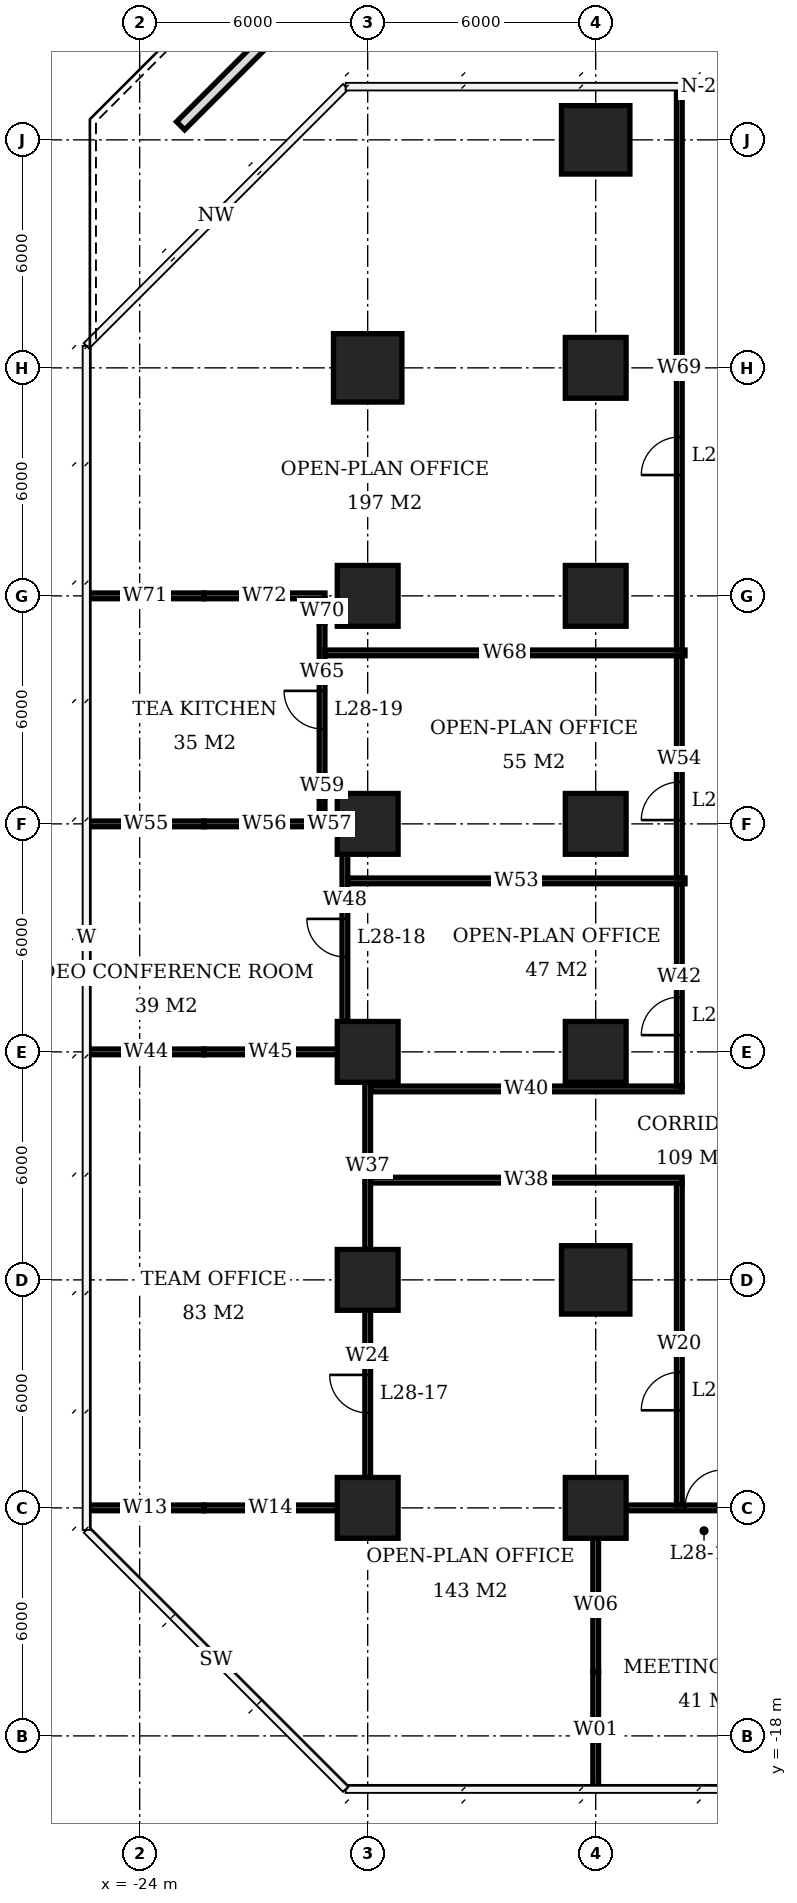
"""IFC4 building model, lengths in metres.
Left out: names, types, materials, properties, quantities, classifications, styles, units other than length and angle.
Written with IfcOpenShell. Run it as: python <this file> out.ifc"""

import sys

from ifc_helpers import new_model, si_unit, direction, frame, frame_2d, origin, origin_2d, place, context, subcontext, project, spatial, rectangle, extrude, element, fill, save


model = new_model("IFC4")
c1 = context("Model", 3, precision=1e-05, world=origin(), true_north=direction((0.0, 1.0)))
c2 = subcontext(c1, "Body", "Model", "MODEL_VIEW")
j1 = project(units=[si_unit("LENGTHUNIT", "METRE"), si_unit("PLANEANGLEUNIT", "RADIAN")], contexts=[c1])
p1 = place(None, origin())
s1 = spatial("IfcSite", under=j1, at=p1, CompositionType="ELEMENT")
p2 = place(p1, origin())
s2 = spatial("IfcBuilding", under=s1, at=p2, CompositionType="ELEMENT")
p3 = place(p2, frame((0.0, 0.0, 117.2)))
s3 = spatial("IfcBuildingStorey", under=s2, at=p3, CompositionType="ELEMENT", Elevation=117.2)
for number, where, z_axis, x_axis in (
    (1, (-18.0, -12.0, 0.0), (0.0, 0.0, 1.0), (1.0, 0.0, 0.0)),
    (2, (-18.0, -6.0, 0.0), (0.0, 0.0, 1.0), (1.0, 0.0, 0.0)),
    (3, (-18.0, 0.0, 0.0), (0.0, 0.0, 1.0), (1.0, 0.0, 0.0)),
    (4, (-18.0, 6.0, 0.0), (0.0, 0.0, 1.0), (1.0, 0.0, 0.0)),
    (5, (-18.0, 12.0, 0.0), (0.0, 0.0, 1.0), (1.0, 0.0, 0.0)),
):
    element("IfcColumn", number, at=place(p3, frame(where, z_axis=z_axis, x_axis=x_axis)), inside=s3, PredefinedType="COLUMN", context=c2, shape_type="SweptSolid", body=[
        extrude(rectangle(XDim=1.6, YDim=1.6, at=origin_2d()), origin(), (0.0, 0.0, 1.0), 3.9),
    ])
p4 = place(p3, frame((-18.0, 18.0, 0.0), z_axis=(0.0, 0.0, 1.0), x_axis=(1.0, 0.0, 0.0)))
e6 = element("IfcColumn", 6, at=p4, inside=s3, PredefinedType="COLUMN", context=c2, shape_type="SweptSolid", body=[
    extrude(rectangle(XDim=1.8, YDim=1.8, at=origin_2d()), origin(), (0.0, 0.0, 1.0), 3.9),
])
p5 = place(p3, frame((-12.0, -12.0, 0.0), z_axis=(0.0, 0.0, 1.0), x_axis=(1.0, 0.0, 0.0)))
e7 = element("IfcColumn", 7, at=p5, inside=s3, PredefinedType="COLUMN", context=c2, shape_type="SweptSolid", body=[
    extrude(rectangle(XDim=1.6, YDim=1.6, at=origin_2d()), origin(), (0.0, 0.0, 1.0), 3.9),
])
p6 = place(p3, frame((-12.0, -6.0, 0.0), z_axis=(0.0, 0.0, 1.0), x_axis=(1.0, 0.0, 0.0)))
e8 = element("IfcColumn", 8, at=p6, inside=s3, PredefinedType="COLUMN", context=c2, shape_type="SweptSolid", body=[
    extrude(rectangle(XDim=1.8, YDim=1.8, at=origin_2d()), origin(), (0.0, 0.0, 1.0), 3.9),
])
for number, where, z_axis, x_axis in (
    (9, (-12.0, 0.0, 0.0), (0.0, 0.0, 1.0), (1.0, 0.0, 0.0)),
    (10, (-12.0, 6.0, 0.0), (0.0, 0.0, 1.0), (1.0, 0.0, 0.0)),
    (11, (-12.0, 12.0, 0.0), (0.0, 0.0, 1.0), (1.0, 0.0, 0.0)),
    (12, (-12.0, 18.0, 0.0), (0.0, 0.0, 1.0), (1.0, 0.0, 0.0)),
):
    element("IfcColumn", number, at=place(p3, frame(where, z_axis=z_axis, x_axis=x_axis)), inside=s3, PredefinedType="COLUMN", context=c2, shape_type="SweptSolid", body=[
        extrude(rectangle(XDim=1.6, YDim=1.6, at=origin_2d()), origin(), (0.0, 0.0, 1.0), 3.9),
    ])
p7 = place(p3, frame((-12.0, 24.0, 0.0), z_axis=(0.0, 0.0, 1.0), x_axis=(1.0, 0.0, 0.0)))
e13 = element("IfcColumn", 13, at=p7, inside=s3, PredefinedType="COLUMN", context=c2, shape_type="SweptSolid", body=[
    extrude(rectangle(XDim=1.8, YDim=1.8, at=origin_2d()), origin(), (0.0, 0.0, 1.0), 3.9),
])
p8 = place(p3, frame((-22.923, 24.37, 0.0), z_axis=(0.0, 0.0, 1.0), x_axis=(0.707106781187, 0.707106781187, 0.0)))
e14 = element("IfcWall", 14, at=p8, inside=s3, PredefinedType="USERDEFINED", context=c2, shape_type="SweptSolid", body=[
    extrude(rectangle(XDim=6.438, YDim=0.3, at=frame_2d((3.219, 0.0))), origin(), (0.0, 0.0, 1.0), 0.6),
])
p9 = place(p3, frame((-25.4, -12.0, 0.0), z_axis=(0.0, 0.0, 1.0), x_axis=(1.0, 0.0, 0.0)))
e15 = element("IfcWall", 15, at=p9, inside=s3, PredefinedType="PARTITIONING", context=c2, shape_type="SweptSolid", body=[
    extrude(rectangle(XDim=3.09, YDim=0.15, at=frame_2d((1.545, 0.0))), origin(), (0.0, 0.0, 1.0), 3.65),
])
p10 = place(p3, frame((-22.31, -12.0, 0.0), z_axis=(0.0, 0.0, 1.0), x_axis=(1.0, 0.0, 0.0)))
e16 = element("IfcWall", 16, at=p10, inside=s3, PredefinedType="PARTITIONING", context=c2, shape_type="SweptSolid", body=[
    extrude(rectangle(XDim=3.51, YDim=0.15, at=frame_2d((1.755, 0.0))), origin(), (0.0, 0.0, 1.0), 2.65),
])
p11 = place(p3, frame((-11.2, -12.0, 0.0), z_axis=(0.0, 0.0, 1.0), x_axis=(1.0, 0.0, 0.0)))
e17 = element("IfcWall", 17, at=p11, inside=s3, PredefinedType="PARTITIONING", context=c2, shape_type="SweptSolid", body=[
    extrude(rectangle(XDim=4.1, YDim=0.15, at=frame_2d((2.05, 0.0))), origin(), (0.0, 0.0, 1.0), 3.65),
])
p12 = place(p11, frame((1.55, 0.0, 0.0)))
e18 = element("IfcOpeningElement", 18, at=p12, cuts=e17, PredefinedType="OPENING", context=c2, shape_type="SweptSolid", body=[
    extrude(rectangle(XDim=1.0, YDim=2.1, at=frame_2d((0.5, 1.05))), frame((0.0, 0.085, 0.0), z_axis=(0.0, -1.0, 0.0), x_axis=(1.0, 0.0, 0.0)), (0.0, 0.0, 1.0), 0.17),
])
p13 = place(p3, frame((-25.35, 0.0, 0.0), z_axis=(0.0, 0.0, 1.0), x_axis=(1.0, 0.0, 0.0)))
e19 = element("IfcWall", 19, at=p13, inside=s3, PredefinedType="PARTITIONING", context=c2, shape_type="SweptSolid", body=[
    extrude(rectangle(XDim=3.04, YDim=0.15, at=frame_2d((1.52, 0.0))), origin(), (0.0, 0.0, 1.0), 3.65),
])
p14 = place(p3, frame((-22.31, 0.0, 0.0), z_axis=(0.0, 0.0, 1.0), x_axis=(1.0, 0.0, 0.0)))
e20 = element("IfcWall", 20, at=p14, inside=s3, PredefinedType="PARTITIONING", context=c2, shape_type="SweptSolid", body=[
    extrude(rectangle(XDim=3.51, YDim=0.15, at=frame_2d((1.755, 0.0))), origin(), (0.0, 0.0, 1.0), 2.65),
])
p15 = place(p3, frame((-25.35, 6.0, 0.0), z_axis=(0.0, 0.0, 1.0), x_axis=(1.0, 0.0, 0.0)))
e21 = element("IfcWall", 21, at=p15, inside=s3, PredefinedType="PARTITIONING", context=c2, shape_type="SweptSolid", body=[
    extrude(rectangle(XDim=3.04, YDim=0.15, at=frame_2d((1.52, 0.0))), origin(), (0.0, 0.0, 1.0), 3.65),
])
p16 = place(p3, frame((-22.31, 6.0, 0.0), z_axis=(0.0, 0.0, 1.0), x_axis=(1.0, 0.0, 0.0)))
e22 = element("IfcWall", 22, at=p16, inside=s3, PredefinedType="PARTITIONING", context=c2, shape_type="SweptSolid", body=[
    extrude(rectangle(XDim=3.185, YDim=0.15, at=frame_2d((1.593, 0.0))), origin(), (0.0, 0.0, 1.0), 2.65),
])
p17 = place(p3, frame((-19.2, 6.0, 0.0), z_axis=(0.0, 0.0, 1.0), x_axis=(1.0, 0.0, 0.0)))
e23 = element("IfcWall", 23, at=p17, inside=s3, PredefinedType="PARTITIONING", context=c2, shape_type="SweptSolid", body=[
    extrude(rectangle(XDim=0.4, YDim=0.15, at=frame_2d((0.2, 0.0))), origin(), (0.0, 0.0, 1.0), 2.65),
])
p18 = place(p3, frame((-25.4, 12.0, 0.0), z_axis=(0.0, 0.0, 1.0), x_axis=(1.0, 0.0, 0.0)))
e24 = element("IfcWall", 24, at=p18, inside=s3, PredefinedType="PARTITIONING", context=c2, shape_type="SweptSolid", body=[
    extrude(rectangle(XDim=3.09, YDim=0.15, at=frame_2d((1.545, 0.0))), origin(), (0.0, 0.0, 1.0), 3.65),
])
p19 = place(p3, frame((-22.31, 12.0, 0.0), z_axis=(0.0, 0.0, 1.0), x_axis=(1.0, 0.0, 0.0)))
e25 = element("IfcWall", 25, at=p19, inside=s3, PredefinedType="PARTITIONING", context=c2, shape_type="SweptSolid", body=[
    extrude(rectangle(XDim=3.185, YDim=0.15, at=frame_2d((1.593, 0.0))), origin(), (0.0, 0.0, 1.0), 2.65),
])
p20 = place(p3, frame((-19.2, 6.075, 0.0), z_axis=(0.0, 0.0, 1.0), x_axis=(0.0, 1.0, 0.0)))
e26 = element("IfcWall", 26, at=p20, inside=s3, PredefinedType="PARTITIONING", context=c2, shape_type="SweptSolid", body=[
    extrude(rectangle(XDim=0.635, YDim=0.15, at=frame_2d((0.317, 0.0))), origin(), (0.0, 0.0, 1.0), 2.65),
])
p21 = place(p3, frame((-19.2, 6.71, 0.0), z_axis=(0.0, 0.0, 1.0), x_axis=(0.0, 1.0, 0.0)))
e27 = element("IfcWall", 27, at=p21, inside=s3, PredefinedType="PARTITIONING", context=c2, shape_type="SweptSolid", body=[
    extrude(rectangle(XDim=4.58, YDim=0.15, at=frame_2d((2.29, 0.0))), origin(), (0.0, 0.0, 1.0), 3.65),
])
p22 = place(p21, frame((1.79, 0.0, 0.0)))
e28 = element("IfcOpeningElement", 28, at=p22, cuts=e27, PredefinedType="OPENING", context=c2, shape_type="SweptSolid", body=[
    extrude(rectangle(XDim=1.0, YDim=2.1, at=frame_2d((0.5, 1.05))), frame((0.0, 0.085, 0.0), z_axis=(0.0, -1.0, 0.0), x_axis=(1.0, 0.0, 0.0)), (0.0, 0.0, 1.0), 0.17),
])
p23 = place(p3, frame((-19.2, 11.29, 0.0), z_axis=(0.0, 0.0, 1.0), x_axis=(0.0, 1.0, 0.0)))
e29 = element("IfcWall", 29, at=p23, inside=s3, PredefinedType="PARTITIONING", context=c2, shape_type="SweptSolid", body=[
    extrude(rectangle(XDim=0.635, YDim=0.15, at=frame_2d((0.317, 0.0))), origin(), (0.0, 0.0, 1.0), 2.65),
])
p24 = place(p3, frame((-18.6, 0.8, 0.0), z_axis=(0.0, 0.0, 1.0), x_axis=(0.0, 1.0, 0.0)))
e30 = element("IfcWall", 30, at=p24, inside=s3, PredefinedType="PARTITIONING", context=c2, shape_type="SweptSolid", body=[
    extrude(rectangle(XDim=4.4, YDim=0.15, at=frame_2d((2.2, 0.0))), origin(), (0.0, 0.0, 1.0), 3.65),
])
p25 = place(p24, frame((1.7, 0.0, 0.0)))
e31 = element("IfcOpeningElement", 31, at=p25, cuts=e30, PredefinedType="OPENING", context=c2, shape_type="SweptSolid", body=[
    extrude(rectangle(XDim=1.0, YDim=2.1, at=frame_2d((0.5, 1.05))), frame((0.0, 0.085, 0.0), z_axis=(0.0, -1.0, 0.0), x_axis=(1.0, 0.0, 0.0)), (0.0, 0.0, 1.0), 0.17),
])
p26 = place(p3, frame((-18.0, -11.2, 0.0), z_axis=(0.0, 0.0, 1.0), x_axis=(0.0, 1.0, 0.0)))
e32 = element("IfcWall", 32, at=p26, inside=s3, PredefinedType="PARTITIONING", context=c2, shape_type="SweptSolid", body=[
    extrude(rectangle(XDim=4.4, YDim=0.15, at=frame_2d((2.2, 0.0))), origin(), (0.0, 0.0, 1.0), 3.65),
])
p27 = place(p26, frame((1.7, 0.0, 0.0)))
e33 = element("IfcOpeningElement", 33, at=p27, cuts=e32, PredefinedType="OPENING", context=c2, shape_type="SweptSolid", body=[
    extrude(rectangle(XDim=1.0, YDim=2.1, at=frame_2d((0.5, 1.05))), frame((0.0, 0.085, 0.0), z_axis=(0.0, -1.0, 0.0), x_axis=(1.0, 0.0, 0.0)), (0.0, 0.0, 1.0), 0.17),
])
p28 = place(p3, frame((-18.0, -5.2, 0.0), z_axis=(0.0, 0.0, 1.0), x_axis=(0.0, 1.0, 0.0)))
e34 = element("IfcWall", 34, at=p28, inside=s3, PredefinedType="PARTITIONING", context=c2, shape_type="SweptSolid", body=[
    extrude(rectangle(XDim=4.4, YDim=0.15, at=frame_2d((2.2, 0.0))), origin(), (0.0, 0.0, 1.0), 3.65),
])
p29 = place(p3, frame((-12.0, -19.4, 0.0), z_axis=(0.0, 0.0, 1.0), x_axis=(0.0, 1.0, 0.0)))
e35 = element("IfcWall", 35, at=p29, inside=s3, PredefinedType="PARTITIONING", context=c2, shape_type="SweptSolid", body=[
    extrude(rectangle(XDim=3.09, YDim=0.15, at=frame_2d((1.545, 0.0))), origin(), (0.0, 0.0, 1.0), 3.65),
])
p30 = place(p3, frame((-12.0, -16.31, 0.0), z_axis=(0.0, 0.0, 1.0), x_axis=(0.0, 1.0, 0.0)))
e36 = element("IfcWall", 36, at=p30, inside=s3, PredefinedType="PARTITIONING", context=c2, shape_type="SweptSolid", body=[
    extrude(rectangle(XDim=3.51, YDim=0.15, at=frame_2d((1.755, 0.0))), origin(), (0.0, 0.0, 1.0), 2.65),
])
p31 = place(p3, frame((-19.125, 10.5, 0.0), z_axis=(0.0, 0.0, 1.0), x_axis=(1.0, 0.0, 0.0)))
e37 = element("IfcWall", 37, at=p31, inside=s3, PredefinedType="PARTITIONING", context=c2, shape_type="SweptSolid", body=[
    extrude(rectangle(XDim=9.475, YDim=0.15, at=frame_2d((4.738, 0.0))), origin(), (0.0, 0.0, 1.0), 3.65),
])
p32 = place(p3, frame((-18.525, 4.5, 0.0), z_axis=(0.0, 0.0, 1.0), x_axis=(1.0, 0.0, 0.0)))
e38 = element("IfcWall", 38, at=p32, inside=s3, PredefinedType="PARTITIONING", context=c2, shape_type="SweptSolid", body=[
    extrude(rectangle(XDim=8.875, YDim=0.15, at=frame_2d((4.438, 0.0))), origin(), (0.0, 0.0, 1.0), 3.65),
])
for number, where, z_axis, x_axis in (
    (39, (-17.925, -3.375, 0.0), (0.0, 0.0, 1.0), (1.0, 0.0, 0.0)),
    (40, (-17.925, -0.975, 0.0), (0.0, 0.0, 1.0), (1.0, 0.0, 0.0)),
):
    element("IfcWall", number, at=place(p3, frame(where, z_axis=z_axis, x_axis=x_axis)), inside=s3, PredefinedType="PARTITIONING", context=c2, shape_type="SweptSolid", body=[
        extrude(rectangle(XDim=8.2, YDim=0.15, at=frame_2d((4.1, 0.0))), origin(), (0.0, 0.0, 1.0), 3.65),
    ])
p33 = place(p3, frame((-9.8, -11.925, 0.0), z_axis=(0.0, 0.0, 1.0), x_axis=(0.0, 1.0, 0.0)))
e41 = element("IfcWall", 41, at=p33, inside=s3, PredefinedType="PARTITIONING", context=c2, shape_type="SweptSolid", body=[
    extrude(rectangle(XDim=8.475, YDim=0.15, at=frame_2d((4.238, 0.0))), origin(), (0.0, 0.0, 1.0), 3.65),
])
p34 = place(p33, frame((2.493, 0.0, 0.0)))
e42 = element("IfcOpeningElement", 42, at=p34, cuts=e41, PredefinedType="OPENING", context=c2, shape_type="SweptSolid", body=[
    extrude(rectangle(XDim=1.0, YDim=2.1, at=frame_2d((0.5, 1.05))), frame((0.0, 0.085, 0.0), z_axis=(0.0, -1.0, 0.0), x_axis=(1.0, 0.0, 0.0)), (0.0, 0.0, 1.0), 0.17),
])
p35 = place(p3, frame((-9.8, -0.9, 0.0), z_axis=(0.0, 0.0, 1.0), x_axis=(0.0, 1.0, 0.0)))
e43 = element("IfcWall", 43, at=p35, inside=s3, PredefinedType="PARTITIONING", context=c2, shape_type="SweptSolid", body=[
    extrude(rectangle(XDim=5.325, YDim=0.15, at=frame_2d((2.663, 0.0))), origin(), (0.0, 0.0, 1.0), 3.65),
])
p36 = place(p35, frame((1.341, 0.0, 0.0)))
e44 = element("IfcOpeningElement", 44, at=p36, cuts=e43, PredefinedType="OPENING", context=c2, shape_type="SweptSolid", body=[
    extrude(rectangle(XDim=1.0, YDim=2.1, at=frame_2d((0.5, 1.05))), frame((0.0, 0.085, 0.0), z_axis=(0.0, -1.0, 0.0), x_axis=(1.0, 0.0, 0.0)), (0.0, 0.0, 1.0), 0.17),
])
p37 = place(p3, frame((-9.8, 4.575, 0.0), z_axis=(0.0, 0.0, 1.0), x_axis=(0.0, 1.0, 0.0)))
e45 = element("IfcWall", 45, at=p37, inside=s3, PredefinedType="PARTITIONING", context=c2, shape_type="SweptSolid", body=[
    extrude(rectangle(XDim=5.85, YDim=0.15, at=frame_2d((2.925, 0.0))), origin(), (0.0, 0.0, 1.0), 3.65),
])
p38 = place(p37, frame((1.525, 0.0, 0.0)))
e46 = element("IfcOpeningElement", 46, at=p38, cuts=e45, PredefinedType="OPENING", context=c2, shape_type="SweptSolid", body=[
    extrude(rectangle(XDim=1.0, YDim=2.1, at=frame_2d((0.5, 1.05))), frame((0.0, 0.085, 0.0), z_axis=(0.0, -1.0, 0.0), x_axis=(1.0, 0.0, 0.0)), (0.0, 0.0, 1.0), 0.17),
])
p39 = place(p3, frame((-9.8, 10.575, 0.0), z_axis=(0.0, 0.0, 1.0), x_axis=(0.0, 1.0, 0.0)))
e47 = element("IfcWall", 47, at=p39, inside=s3, PredefinedType="PARTITIONING", context=c2, shape_type="SweptSolid", body=[
    extrude(rectangle(XDim=14.825, YDim=0.15, at=frame_2d((7.413, 0.0))), origin(), (0.0, 0.0, 1.0), 3.65),
])
p40 = place(p39, frame((4.605, 0.0, 0.0)))
e48 = element("IfcOpeningElement", 48, at=p40, cuts=e47, PredefinedType="OPENING", context=c2, shape_type="SweptSolid", body=[
    extrude(rectangle(XDim=1.0, YDim=2.1, at=frame_2d((0.5, 1.05))), frame((0.0, 0.085, 0.0), z_axis=(0.0, -1.0, 0.0), x_axis=(1.0, 0.0, 0.0)), (0.0, 0.0, 1.0), 0.17),
])
p41 = place(p12, origin())
e49 = element("IfcDoor", 49, at=p41, inside=s3, OperationType="SINGLE_SWING_RIGHT", PredefinedType="DOOR", context=c2, shape_type="SweptSolid", body=[
    extrude(rectangle(XDim=1.0, YDim=2.1, at=frame_2d((0.5, 1.05))), frame((0.0, 0.025, 0.0), z_axis=(0.0, -1.0, 0.0), x_axis=(1.0, 0.0, 0.0)), (0.0, 0.0, 1.0), 0.05),
])
fill(e18, e49)
p42 = place(p27, origin())
e50 = element("IfcDoor", 50, at=p42, inside=s3, OperationType="SINGLE_SWING_RIGHT", PredefinedType="DOOR", context=c2, shape_type="SweptSolid", body=[
    extrude(rectangle(XDim=1.0, YDim=2.1, at=frame_2d((0.5, 1.05))), frame((0.0, 0.025, 0.0), z_axis=(0.0, -1.0, 0.0), x_axis=(1.0, 0.0, 0.0)), (0.0, 0.0, 1.0), 0.05),
])
fill(e33, e50)
p43 = place(p25, origin())
e51 = element("IfcDoor", 51, at=p43, inside=s3, OperationType="SINGLE_SWING_RIGHT", PredefinedType="DOOR", context=c2, shape_type="SweptSolid", body=[
    extrude(rectangle(XDim=1.0, YDim=2.1, at=frame_2d((0.5, 1.05))), frame((0.0, 0.025, 0.0), z_axis=(0.0, -1.0, 0.0), x_axis=(1.0, 0.0, 0.0)), (0.0, 0.0, 1.0), 0.05),
])
fill(e31, e51)
p44 = place(p22, origin())
e52 = element("IfcDoor", 52, at=p44, inside=s3, OperationType="SINGLE_SWING_RIGHT", PredefinedType="DOOR", context=c2, shape_type="SweptSolid", body=[
    extrude(rectangle(XDim=1.0, YDim=2.1, at=frame_2d((0.5, 1.05))), frame((0.0, 0.025, 0.0), z_axis=(0.0, -1.0, 0.0), x_axis=(1.0, 0.0, 0.0)), (0.0, 0.0, 1.0), 0.05),
])
fill(e28, e52)
p45 = place(p34, origin())
e53 = element("IfcDoor", 53, at=p45, inside=s3, OperationType="SINGLE_SWING_LEFT", PredefinedType="DOOR", context=c2, shape_type="SweptSolid", body=[
    extrude(rectangle(XDim=1.0, YDim=2.1, at=frame_2d((0.5, 1.05))), frame((0.0, 0.025, 0.0), z_axis=(0.0, -1.0, 0.0), x_axis=(1.0, 0.0, 0.0)), (0.0, 0.0, 1.0), 0.05),
])
fill(e42, e53)
p46 = place(p38, origin())
e54 = element("IfcDoor", 54, at=p46, inside=s3, OperationType="SINGLE_SWING_LEFT", PredefinedType="DOOR", context=c2, shape_type="SweptSolid", body=[
    extrude(rectangle(XDim=1.0, YDim=2.1, at=frame_2d((0.5, 1.05))), frame((0.0, 0.025, 0.0), z_axis=(0.0, -1.0, 0.0), x_axis=(1.0, 0.0, 0.0)), (0.0, 0.0, 1.0), 0.05),
])
fill(e46, e54)
p47 = place(p40, origin())
e55 = element("IfcDoor", 55, at=p47, inside=s3, OperationType="SINGLE_SWING_LEFT", PredefinedType="DOOR", context=c2, shape_type="SweptSolid", body=[
    extrude(rectangle(XDim=1.0, YDim=2.1, at=frame_2d((0.5, 1.05))), frame((0.0, 0.025, 0.0), z_axis=(0.0, -1.0, 0.0), x_axis=(1.0, 0.0, 0.0)), (0.0, 0.0, 1.0), 0.05),
])
fill(e48, e55)
p48 = place(p36, origin())
e56 = element("IfcDoor", 56, at=p48, inside=s3, OperationType="SINGLE_SWING_LEFT", PredefinedType="DOOR", context=c2, shape_type="SweptSolid", body=[
    extrude(rectangle(XDim=1.0, YDim=2.1, at=frame_2d((0.5, 1.05))), frame((0.0, 0.025, 0.0), z_axis=(0.0, -1.0, 0.0), x_axis=(1.0, 0.0, 0.0)), (0.0, 0.0, 1.0), 0.05),
])
fill(e44, e56)
save(model, sys.argv[1])
